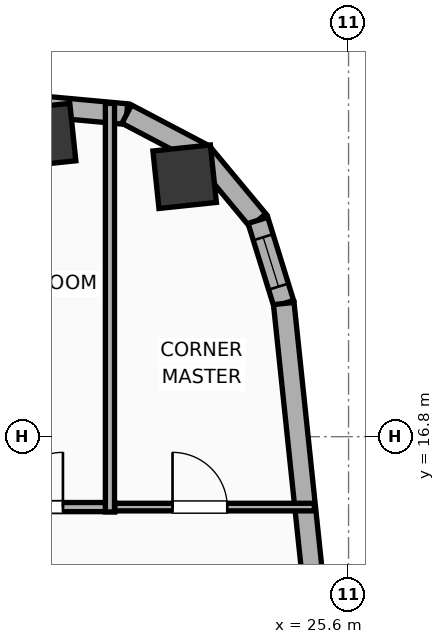
"""IFC4 building model, lengths in metres.
Left out: names, types, materials, properties, quantities, classifications, styles, units other than length and angle.
Written with IfcOpenShell. Run it as: python <this file> out.ifc"""

import sys

from ifc_helpers import new_model, si_unit, direction, frame, frame_2d, origin, origin_2d, place, context, subcontext, project, spatial, rectangle, hollow_rectangle, hollow_circle, extrude, element, fill, save


model = new_model("IFC4")
c1 = context("Model", 3, precision=1e-05, world=origin(), true_north=direction((0.0, 1.0)))
c2 = subcontext(c1, "Body", "Model", "MODEL_VIEW")
j1 = project(units=[si_unit("LENGTHUNIT", "METRE"), si_unit("PLANEANGLEUNIT", "RADIAN")], contexts=[c1])
p1 = place(None, origin())
s1 = spatial("IfcSite", under=j1, at=p1, CompositionType="ELEMENT")
p2 = place(p1, origin())
s2 = spatial("IfcBuilding", under=s1, at=p2, CompositionType="ELEMENT")
p3 = place(p2, frame((0.0, 0.0, 167.7)))
s3 = spatial("IfcBuildingStorey", under=s2, at=p3, CompositionType="ELEMENT", Elevation=167.7)
p4 = place(p3, frame((22.905, 21.075, 0.0), z_axis=(0.0, 0.0, 1.0), x_axis=(0.994521895368, 0.104528463268, 0.0)))
e1 = element("IfcColumn", 1, at=p4, inside=s3, PredefinedType="COLUMN", context=c2, shape_type="SweptSolid", body=[
    extrude(hollow_circle(Radius=0.475, WallThickness=0.032, at=origin_2d()), origin(), (0.0, 0.0, 1.0), 3.9),
])
p5 = place(p3, frame((20.593, 21.76, 0.0), z_axis=(0.0, 0.0, 1.0), x_axis=(0.994521895368, 0.104528463268, 0.0)))
e2 = element("IfcColumn", 2, at=p5, inside=s3, PredefinedType="COLUMN", context=c2, shape_type="SweptSolid", body=[
    extrude(hollow_rectangle(XDim=0.95, YDim=0.95, WallThickness=0.032, at=origin_2d()), origin(), (0.0, 0.0, 1.0), 3.9),
])
p6 = place(p3, frame((20.526, 22.235, 0.0), z_axis=(0.0, 0.0, 1.0), x_axis=(0.995800460351, -0.091550222087, 0.0)))
e3 = element("IfcWall", 3, at=p6, inside=s3, PredefinedType="ELEMENTEDWALL", context=c2, shape_type="SweptSolid", body=[
    extrude(rectangle(XDim=1.432, YDim=0.34, at=frame_2d((0.716, 0.0))), origin(), (0.0, 0.0, 1.0), 3.65),
])
p7 = place(p3, frame((21.952, 22.104, 0.0), z_axis=(0.0, 0.0, 1.0), x_axis=(0.885023004245, -0.465547292933, 0.0)))
e4 = element("IfcWall", 4, at=p7, inside=s3, PredefinedType="ELEMENTEDWALL", context=c2, shape_type="SweptSolid", body=[
    extrude(rectangle(XDim=1.415, YDim=0.34, at=frame_2d((0.708, 0.0))), origin(), (0.0, 0.0, 1.0), 3.65),
])
p8 = place(p3, frame((23.205, 21.445, 0.0), z_axis=(0.0, 0.0, 1.0), x_axis=(0.639539337522, -0.768758372808, 0.0)))
e5 = element("IfcWall", 5, at=p8, inside=s3, PredefinedType="ELEMENTEDWALL", context=c2, shape_type="SweptSolid", body=[
    extrude(rectangle(XDim=1.415, YDim=0.34, at=frame_2d((0.708, 0.0))), origin(), (0.0, 0.0, 1.0), 3.65),
])
p9 = place(p3, frame((24.11, 20.357, 0.0), z_axis=(0.0, 0.0, 1.0), x_axis=(0.296420660287, -0.955057481074, 0.0)))
e6 = element("IfcWall", 6, at=p9, inside=s3, PredefinedType="ELEMENTEDWALL", context=c2, shape_type="SweptSolid", body=[
    extrude(rectangle(XDim=1.432, YDim=0.34, at=frame_2d((0.716, 0.0))), origin(), (0.0, 0.0, 1.0), 3.65),
])
p10 = place(p9, frame((0.291, 0.0, 0.75)))
e7 = element("IfcOpeningElement", 7, at=p10, cuts=e6, PredefinedType="OPENING", context=c2, shape_type="SweptSolid", body=[
    extrude(rectangle(XDim=0.85, YDim=2.05, at=frame_2d((0.425, 1.025))), frame((0.0, 0.18, 0.0), z_axis=(0.0, -1.0, 0.0), x_axis=(1.0, 0.0, 0.0)), (0.0, 0.0, 1.0), 0.36),
])
p11 = place(p3, frame((24.534, 18.99, 0.0), z_axis=(0.0, 0.0, 1.0), x_axis=(0.104534959766, -0.994521212537, 0.0)))
e8 = element("IfcWall", 8, at=p11, inside=s3, PredefinedType="ELEMENTEDWALL", context=c2, shape_type="SweptSolid", body=[
    extrude(rectangle(XDim=33.166, YDim=0.34, at=frame_2d((16.583, 0.0))), origin(), (0.0, 0.0, 1.0), 3.65),
])
p12 = place(p11, frame((6.542, 0.0, 0.75)))
e9 = element("IfcOpeningElement", 9, at=p12, cuts=e8, PredefinedType="OPENING", context=c2, shape_type="SweptSolid", body=[
    extrude(rectangle(XDim=1.8, YDim=2.1, at=frame_2d((0.9, 1.05))), frame((0.0, 0.18, 0.0), z_axis=(0.0, -1.0, 0.0), x_axis=(1.0, 0.0, 0.0)), (0.0, 0.0, 1.0), 0.36),
])
p13 = place(p11, frame((24.825, 0.0, 0.75)))
e10 = element("IfcOpeningElement", 10, at=p13, cuts=e8, PredefinedType="OPENING", context=c2, shape_type="SweptSolid", body=[
    extrude(rectangle(XDim=1.8, YDim=2.1, at=frame_2d((0.9, 1.05))), frame((0.0, 0.18, 0.0), z_axis=(0.0, -1.0, 0.0), x_axis=(1.0, 0.0, 0.0)), (0.0, 0.0, 1.0), 0.36),
])
p14 = place(p11, frame((18.557, 0.0, 0.75)))
e11 = element("IfcOpeningElement", 11, at=p14, cuts=e8, PredefinedType="OPENING", context=c2, shape_type="SweptSolid", body=[
    extrude(rectangle(XDim=1.2, YDim=2.05, at=frame_2d((0.6, 1.025))), frame((0.0, 0.18, 0.0), z_axis=(0.0, -1.0, 0.0), x_axis=(1.0, 0.0, 0.0)), (0.0, 0.0, 1.0), 0.36),
])
p15 = place(p3, frame((21.616, 15.642, 0.0), z_axis=(0.0, 0.0, 1.0), x_axis=(1.0, 0.0, 0.0)))
e12 = element("IfcWall", 12, at=p15, inside=s3, PredefinedType="PARTITIONING", context=c2, shape_type="SweptSolid", body=[
    extrude(rectangle(XDim=3.421, YDim=0.125, at=frame_2d((1.71, 0.0))), origin(), (0.0, 0.0, 1.0), 3.65),
])
p16 = place(p15, frame((1.089, 0.0, 0.0)))
e13 = element("IfcOpeningElement", 13, at=p16, cuts=e12, PredefinedType="OPENING", context=c2, shape_type="SweptSolid", body=[
    extrude(rectangle(XDim=0.9, YDim=2.05, at=frame_2d((0.45, 1.025))), frame((0.0, 0.073, 0.0), z_axis=(0.0, -1.0, 0.0), x_axis=(1.0, 0.0, 0.0)), (0.0, 0.0, 1.0), 0.145),
])
p17 = place(p3, frame((19.15, 15.642, 0.0), z_axis=(0.0, 0.0, 1.0), x_axis=(1.0, 0.0, 0.0)))
e14 = element("IfcWall", 14, at=p17, inside=s3, PredefinedType="PLUMBINGWALL", context=c2, shape_type="SweptSolid", body=[
    extrude(rectangle(XDim=2.606, YDim=0.15, at=frame_2d((1.303, 0.0))), origin(), (0.0, 0.0, 1.0), 3.65),
])
p18 = place(p17, frame((0.853, 0.0, 0.0)))
e15 = element("IfcOpeningElement", 15, at=p18, cuts=e14, PredefinedType="OPENING", context=c2, shape_type="SweptSolid", body=[
    extrude(rectangle(XDim=0.9, YDim=2.05, at=frame_2d((0.45, 1.025))), frame((0.0, 0.085, 0.0), z_axis=(0.0, -1.0, 0.0), x_axis=(1.0, 0.0, 0.0)), (0.0, 0.0, 1.0), 0.17),
])
p19 = place(p3, frame((21.676, 15.562, 0.0), z_axis=(0.0, 0.0, 1.0), x_axis=(0.0, 1.0, 0.0)))
e16 = element("IfcWall", 16, at=p19, inside=s3, PredefinedType="PLUMBINGWALL", context=c2, shape_type="SweptSolid", body=[
    extrude(rectangle(XDim=6.718, YDim=0.15, at=frame_2d((3.359, 0.0))), origin(), (0.0, 0.0, 1.0), 3.04),
])
p20 = place(p10, origin())
e17 = element("IfcWindow", 17, at=p20, inside=s3, PartitioningType="SINGLE_PANEL", PredefinedType="WINDOW", context=c2, shape_type="SweptSolid", body=[
    extrude(rectangle(XDim=0.85, YDim=2.05, at=frame_2d((0.425, 1.025))), frame((0.0, 0.03, 0.0), z_axis=(0.0, -1.0, 0.0), x_axis=(1.0, 0.0, 0.0)), (0.0, 0.0, 1.0), 0.06),
])
fill(e7, e17)
p21 = place(p16, origin())
e18 = element("IfcDoor", 18, at=p21, inside=s3, OperationType="SINGLE_SWING_LEFT", PredefinedType="DOOR", context=c2, shape_type="SweptSolid", body=[
    extrude(rectangle(XDim=0.9, YDim=2.05, at=frame_2d((0.45, 1.025))), frame((0.0, 0.025, 0.0), z_axis=(0.0, -1.0, 0.0), x_axis=(1.0, 0.0, 0.0)), (0.0, 0.0, 1.0), 0.05),
])
fill(e13, e18)
p22 = place(p18, origin())
e19 = element("IfcDoor", 19, at=p22, inside=s3, OperationType="SINGLE_SWING_RIGHT", PredefinedType="DOOR", context=c2, shape_type="SweptSolid", body=[
    extrude(rectangle(XDim=0.9, YDim=2.05, at=frame_2d((0.45, 1.025))), frame((0.0, 0.025, 0.0), z_axis=(0.0, -1.0, 0.0), x_axis=(1.0, 0.0, 0.0)), (0.0, 0.0, 1.0), 0.05),
])
fill(e15, e19)
save(model, sys.argv[1])
